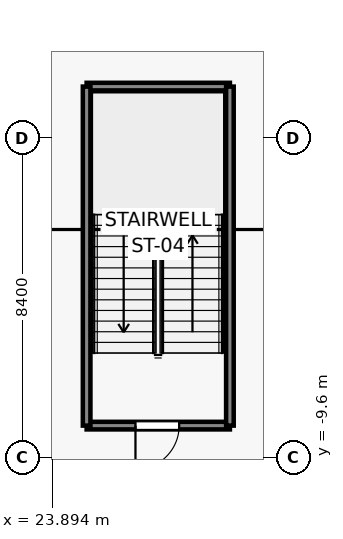
"""IFC4 building model, lengths in metres.
Left out: names, types, materials, properties, quantities, classifications, styles, units other than length and angle.
Written with IfcOpenShell. Run it as: python <this file> out.ifc"""

import sys

from ifc_helpers import new_model, si_unit, direction, frame, frame_2d, origin, place, context, subcontext, project, spatial, rectangle, extrude, source, transform, mapped, element, fill, save


model = new_model("IFC4")
c1 = context("Model", 3, precision=1e-05, world=origin(), true_north=direction((0.0, 1.0)))
c2 = subcontext(c1, "Body", "Model", "MODEL_VIEW")
j1 = project(units=[si_unit("LENGTHUNIT", "METRE"), si_unit("PLANEANGLEUNIT", "RADIAN")], contexts=[c1])
p1 = place(None, origin())
s1 = spatial("IfcSite", under=j1, at=p1, CompositionType="ELEMENT")
p2 = place(p1, origin())
s2 = spatial("IfcBuilding", under=s1, at=p2, CompositionType="ELEMENT")
p3 = place(p2, origin())
s3 = spatial("IfcBuildingStorey", under=s2, at=p3, CompositionType="ELEMENT", Elevation=0.0)
p4 = place(p3, frame((28.56, -8.76, 0.0), z_axis=(0.0, 0.0, 1.0), x_axis=(-1.0, 0.0, 0.0)))
e1 = element("IfcWall", 1, at=p4, inside=s3, PredefinedType="SOLIDWALL", context=c2, shape_type="SweptSolid", body=[
    extrude(rectangle(XDim=3.77, YDim=0.2, at=frame_2d((1.885, 0.0))), origin(), (0.0, 0.0, 1.0), 4.7),
])
p5 = place(p4, frame((1.335, 0.0, 0.0)))
e2 = element("IfcOpeningElement", 2, at=p5, cuts=e1, PredefinedType="OPENING", context=c2, shape_type="SweptSolid", body=[
    extrude(rectangle(XDim=1.15, YDim=2.15, at=frame_2d((0.575, 1.075))), frame((0.0, 0.11, 0.0), z_axis=(0.0, -1.0, 0.0), x_axis=(1.0, 0.0, 0.0)), (0.0, 0.0, 1.0), 0.22),
])
p6 = place(p3, frame((24.79, 0.16, 0.0), z_axis=(0.0, 0.0, 1.0), x_axis=(1.0, 0.0, 0.0)))
e3 = element("IfcWall", 3, at=p6, inside=s3, PredefinedType="SOLIDWALL", context=c2, shape_type="SweptSolid", body=[
    extrude(rectangle(XDim=3.77, YDim=0.2, at=frame_2d((1.885, 0.0))), origin(), (0.0, 0.0, 1.0), 4.7),
])
for number, where, z_axis, x_axis in (
    (4, (24.79, -8.76, 0.0), (0.0, 0.0, 1.0), (0.0, 1.0, 0.0)),
    (5, (28.56, 0.16, 0.0), (0.0, 0.0, 1.0), (0.0, -1.0, 0.0)),
):
    element("IfcWall", number, at=place(p3, frame(where, z_axis=z_axis, x_axis=x_axis)), inside=s3, PredefinedType="SOLIDWALL", context=c2, shape_type="SweptSolid", body=[
        extrude(rectangle(XDim=8.92, YDim=0.2, at=frame_2d((4.46, 0.0))), origin(), (0.0, 0.0, 1.0), 4.7),
    ])
m1 = source(origin(), c2, "Body", "SweptSolid", [
    extrude(rectangle(XDim=1.15, YDim=2.15, at=frame_2d((0.575, 1.075))), frame((0.0, 0.025, 0.0), z_axis=(0.0, -1.0, 0.0), x_axis=(1.0, 0.0, 0.0)), (0.0, 0.0, 1.0), 0.05),
])
p7 = place(p5, origin())
e6 = element("IfcDoor", 6, at=p7, inside=s3, OperationType="SINGLE_SWING_RIGHT", PredefinedType="DOOR", context=c2, shape_type="MappedRepresentation", body=[
    mapped(m1, transform((0.0, 0.0, 0.0), x_axis=(1.0, 0.0, 0.0), y_axis=(0.0, 1.0, 0.0), z_axis=(0.0, 0.0, 1.0), scale=1.0)),
])
fill(e2, e6)
save(model, sys.argv[1])
